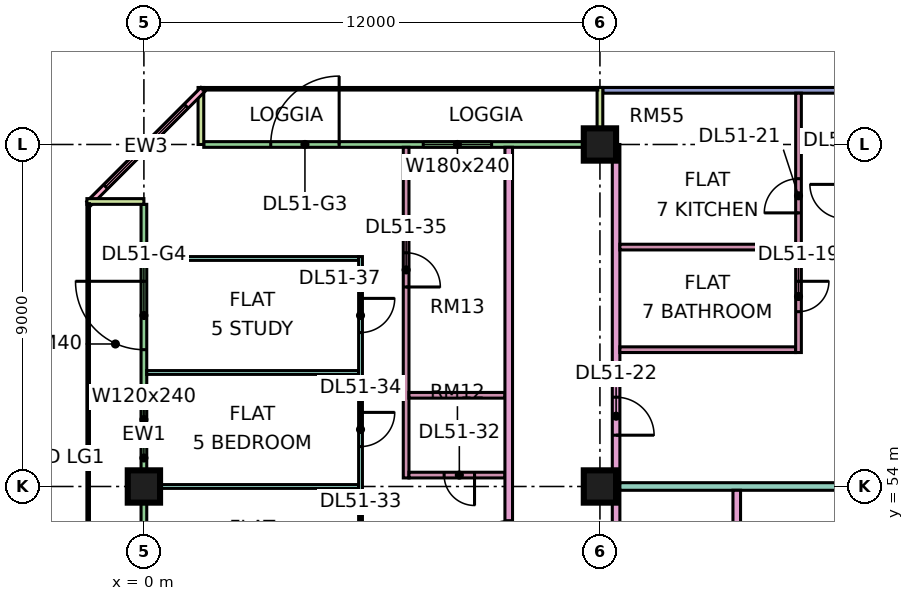
"""IFC4 building model, lengths in metres.
Left out: names, types, materials, properties, quantities, classifications, styles, units other than length and angle.
Written with IfcOpenShell. Run it as: python <this file> out.ifc"""

import sys

from ifc_helpers import new_model, si_unit, direction, frame, frame_2d, origin, origin_2d, place, context, subcontext, project, spatial, rectangle, extrude, element, fill, save


model = new_model("IFC4")
c1 = context("Model", 3, precision=1e-05, world=origin(), true_north=direction((0.0, 1.0)))
c2 = subcontext(c1, "Body", "Model", "MODEL_VIEW")
j1 = project(units=[si_unit("LENGTHUNIT", "METRE"), si_unit("PLANEANGLEUNIT", "RADIAN")], contexts=[c1])
p1 = place(None, origin())
s1 = spatial("IfcSite", under=j1, at=p1, CompositionType="ELEMENT")
p2 = place(p1, origin())
s2 = spatial("IfcBuilding", under=s1, at=p2, CompositionType="ELEMENT")
p3 = place(p2, frame((0.0, 0.0, 219.15)))
s3 = spatial("IfcBuildingStorey", under=s2, at=p3, CompositionType="ELEMENT", Elevation=219.15)
for number, where, z_axis, x_axis in (
    (1, (0.0, 54.0, 0.0), (0.0, 0.0, 1.0), (1.0, 0.0, 0.0)),
    (2, (12.0, 54.0, 0.0), (0.0, 0.0, 1.0), (1.0, 0.0, 0.0)),
    (3, (12.0, 63.0, 0.0), (0.0, 0.0, 1.0), (1.0, 0.0, 0.0)),
):
    element("IfcColumn", number, at=place(p3, frame(where, z_axis=z_axis, x_axis=x_axis)), inside=s3, PredefinedType="COLUMN", context=c2, shape_type="SweptSolid", body=[
        extrude(rectangle(XDim=0.85, YDim=0.85, at=origin_2d()), origin(), (0.0, 0.0, 1.0), 3.75),
    ])
p4 = place(p3, frame((22.5, 64.425, 0.0), z_axis=(0.0, 0.0, 1.0), x_axis=(-1.0, 0.0, 0.0)))
e4 = element("IfcWall", 4, at=p4, inside=s3, PredefinedType="SOLIDWALL", context=c2, shape_type="SweptSolid", body=[
    extrude(rectangle(XDim=10.425, YDim=0.15, at=frame_2d((5.212, 0.0))), origin(), (0.0, 0.0, 1.0), 3.35),
])
p5 = place(p4, frame((0.75, 0.0, 0.45)))
e5 = element("IfcOpeningElement", 5, at=p5, cuts=e4, PredefinedType="OPENING", context=c2, shape_type="SweptSolid", body=[
    extrude(rectangle(XDim=3.0, YDim=2.4, at=frame_2d((1.5, 1.2))), frame((0.0, 0.085, 0.0), z_axis=(0.0, -1.0, 0.0), x_axis=(1.0, 0.0, 0.0)), (0.0, 0.0, 1.0), 0.17),
])
p6 = place(p3, frame((11.925, 63.0, 0.0), z_axis=(0.0, 0.0, 1.0), x_axis=(-1.0, 0.0, 0.0)))
e6 = element("IfcWall", 6, at=p6, inside=s3, PredefinedType="SOLIDWALL", context=c2, shape_type="SweptSolid", body=[
    extrude(rectangle(XDim=10.35, YDim=0.15, at=frame_2d((5.175, 0.0))), origin(), (0.0, 0.0, 1.0), 3.35),
])
p7 = place(p6, frame((2.775, 0.0, 0.45)))
e7 = element("IfcOpeningElement", 7, at=p7, cuts=e6, PredefinedType="OPENING", context=c2, shape_type="SweptSolid", body=[
    extrude(rectangle(XDim=1.8, YDim=2.4, at=frame_2d((0.9, 1.2))), frame((0.0, 0.085, 0.0), z_axis=(0.0, -1.0, 0.0), x_axis=(1.0, 0.0, 0.0)), (0.0, 0.0, 1.0), 0.17),
])
p8 = place(p6, frame((6.788, 0.0, 0.0)))
e8 = element("IfcOpeningElement", 8, at=p8, cuts=e6, PredefinedType="OPENING", context=c2, shape_type="SweptSolid", body=[
    extrude(rectangle(XDim=1.8, YDim=2.4, at=frame_2d((0.9, 1.2))), frame((0.0, 0.085, 0.0), z_axis=(0.0, -1.0, 0.0), x_axis=(1.0, 0.0, 0.0)), (0.0, 0.0, 1.0), 0.17),
])
for number, where, z_axis, x_axis in (
    (9, (12.0, 64.5, 0.0), (0.0, 0.0, 1.0), (0.0, -1.0, 0.0)),
    (10, (1.5, 64.5, 0.0), (0.0, 0.0, 1.0), (0.0, -1.0, 0.0)),
):
    element("IfcWall", number, at=place(p3, frame(where, z_axis=z_axis, x_axis=x_axis)), inside=s3, PredefinedType="SOLIDWALL", context=c2, shape_type="SweptSolid", body=[
        extrude(rectangle(XDim=1.5, YDim=0.15, at=frame_2d((0.75, 0.0))), origin(), (0.0, 0.0, 1.0), 3.35),
    ])
p9 = place(p3, frame((1.553, 64.447, 0.0), z_axis=(0.0, 0.0, 1.0), x_axis=(-0.707106781187, -0.707106781187, 0.0)))
e11 = element("IfcWall", 11, at=p9, inside=s3, PredefinedType="SOLIDWALL", context=c2, shape_type="SweptSolid", body=[
    extrude(rectangle(XDim=4.243, YDim=0.15, at=frame_2d((2.121, 0.0))), origin(), (0.0, 0.0, 1.0), 3.35),
])
p10 = place(p9, frame((0.621, 0.0, 0.45)))
e12 = element("IfcOpeningElement", 12, at=p10, cuts=e11, PredefinedType="OPENING", context=c2, shape_type="SweptSolid", body=[
    extrude(rectangle(XDim=3.0, YDim=2.4, at=frame_2d((1.5, 1.2))), frame((0.0, 0.085, 0.0), z_axis=(0.0, -1.0, 0.0), x_axis=(1.0, 0.0, 0.0)), (0.0, 0.0, 1.0), 0.17),
])
p11 = place(p3, frame((0.0, 61.425, 0.0), z_axis=(0.0, 0.0, 1.0), x_axis=(0.0, -1.0, 0.0)))
e13 = element("IfcWall", 13, at=p11, inside=s3, PredefinedType="SOLIDWALL", context=c2, shape_type="SweptSolid", body=[
    extrude(rectangle(XDim=13.35, YDim=0.15, at=frame_2d((6.675, 0.0))), origin(), (0.0, 0.0, 1.0), 3.35),
])
p12 = place(p11, frame((2.025, 0.0, 0.0)))
e14 = element("IfcOpeningElement", 14, at=p12, cuts=e13, PredefinedType="OPENING", context=c2, shape_type="SweptSolid", body=[
    extrude(rectangle(XDim=1.8, YDim=2.4, at=frame_2d((0.9, 1.2))), frame((0.0, 0.085, 0.0), z_axis=(0.0, -1.0, 0.0), x_axis=(1.0, 0.0, 0.0)), (0.0, 0.0, 1.0), 0.17),
])
p13 = place(p11, frame((5.062, 0.0, 0.45)))
e15 = element("IfcOpeningElement", 15, at=p13, cuts=e13, PredefinedType="OPENING", context=c2, shape_type="SweptSolid", body=[
    extrude(rectangle(XDim=1.2, YDim=2.4, at=frame_2d((0.6, 1.2))), frame((0.0, 0.085, 0.0), z_axis=(0.0, -1.0, 0.0), x_axis=(1.0, 0.0, 0.0)), (0.0, 0.0, 1.0), 0.17),
])
p14 = place(p11, frame((8.587, 0.0, 0.45)))
e16 = element("IfcOpeningElement", 16, at=p14, cuts=e13, PredefinedType="OPENING", context=c2, shape_type="SweptSolid", body=[
    extrude(rectangle(XDim=1.2, YDim=2.4, at=frame_2d((0.6, 1.2))), frame((0.0, 0.085, 0.0), z_axis=(0.0, -1.0, 0.0), x_axis=(1.0, 0.0, 0.0)), (0.0, 0.0, 1.0), 0.17),
])
p15 = place(p11, frame((10.988, 0.0, 0.45)))
e17 = element("IfcOpeningElement", 17, at=p15, cuts=e13, PredefinedType="OPENING", context=c2, shape_type="SweptSolid", body=[
    extrude(rectangle(XDim=1.8, YDim=2.4, at=frame_2d((0.9, 1.2))), frame((0.0, 0.085, 0.0), z_axis=(0.0, -1.0, 0.0), x_axis=(1.0, 0.0, 0.0)), (0.0, 0.0, 1.0), 0.17),
])
p16 = place(p3, frame((-1.5, 61.5, 0.0), z_axis=(0.0, 0.0, 1.0), x_axis=(1.0, 0.0, 0.0)))
e18 = element("IfcWall", 18, at=p16, inside=s3, PredefinedType="SOLIDWALL", context=c2, shape_type="SweptSolid", body=[
    extrude(rectangle(XDim=1.5, YDim=0.15, at=frame_2d((0.75, 0.0))), origin(), (0.0, 0.0, 1.0), 3.35),
])
for number, where, z_axis, x_axis in (
    (19, (0.074, 54.0, 0.0), (0.0, 0.0, 1.0), (1.0, 0.0, 0.0)),
    (20, (0.074, 57.0, 0.0), (0.0, 0.0, 1.0), (1.0, 0.0, 0.0)),
    (21, (0.074, 60.0, 0.0), (0.0, 0.0, 1.0), (1.0, 0.0, 0.0)),
):
    element("IfcWall", number, at=place(p3, frame(where, z_axis=z_axis, x_axis=x_axis)), inside=s3, PredefinedType="PARTITIONING", context=c2, shape_type="SweptSolid", body=[
        extrude(rectangle(XDim=5.576, YDim=0.1, at=frame_2d((2.788, 0.0))), origin(), (0.0, 0.0, 1.0), 3.35),
    ])
p17 = place(p3, frame((5.7, 51.1, 0.0), z_axis=(0.0, 0.0, 1.0), x_axis=(0.0, 1.0, 0.0)))
e22 = element("IfcWall", 22, at=p17, inside=s3, PredefinedType="PARTITIONING", context=c2, shape_type="SweptSolid", body=[
    extrude(rectangle(XDim=8.95, YDim=0.1, at=frame_2d((4.475, 0.0))), origin(), (0.0, 0.0, 1.0), 3.35),
])
p18 = place(p17, frame((0.95, 0.0, 0.0)))
e23 = element("IfcOpeningElement", 23, at=p18, cuts=e22, PredefinedType="OPENING", context=c2, shape_type="SweptSolid", body=[
    extrude(rectangle(XDim=0.9, YDim=2.1, at=frame_2d((0.45, 1.05))), frame((0.0, 0.06, 0.0), z_axis=(0.0, -1.0, 0.0), x_axis=(1.0, 0.0, 0.0)), (0.0, 0.0, 1.0), 0.12),
])
p19 = place(p17, frame((3.95, 0.0, 0.0)))
e24 = element("IfcOpeningElement", 24, at=p19, cuts=e22, PredefinedType="OPENING", context=c2, shape_type="SweptSolid", body=[
    extrude(rectangle(XDim=0.9, YDim=2.1, at=frame_2d((0.45, 1.05))), frame((0.0, 0.06, 0.0), z_axis=(0.0, -1.0, 0.0), x_axis=(1.0, 0.0, 0.0)), (0.0, 0.0, 1.0), 0.12),
])
p20 = place(p17, frame((6.95, 0.0, 0.0)))
e25 = element("IfcOpeningElement", 25, at=p20, cuts=e22, PredefinedType="OPENING", context=c2, shape_type="SweptSolid", body=[
    extrude(rectangle(XDim=0.9, YDim=2.1, at=frame_2d((0.45, 1.05))), frame((0.0, 0.06, 0.0), z_axis=(0.0, -1.0, 0.0), x_axis=(1.0, 0.0, 0.0)), (0.0, 0.0, 1.0), 0.12),
])
p21 = place(p3, frame((6.9, 54.225, 0.0), z_axis=(0.0, 0.0, 1.0), x_axis=(0.0, 1.0, 0.0)))
e26 = element("IfcWall", 26, at=p21, inside=s3, PredefinedType="PARTITIONING", context=c2, shape_type="SweptSolid", body=[
    extrude(rectangle(XDim=8.701, YDim=0.15, at=frame_2d((4.351, 0.0))), origin(), (0.0, 0.0, 1.0), 3.35),
])
p22 = place(p21, frame((5.025, 0.0, 0.0)))
e27 = element("IfcOpeningElement", 27, at=p22, cuts=e26, PredefinedType="OPENING", context=c2, shape_type="SweptSolid", body=[
    extrude(rectangle(XDim=0.9, YDim=2.1, at=frame_2d((0.45, 1.05))), frame((0.0, 0.085, 0.0), z_axis=(0.0, -1.0, 0.0), x_axis=(1.0, 0.0, 0.0)), (0.0, 0.0, 1.0), 0.17),
])
p23 = place(p3, frame((6.975, 54.3, 0.0), z_axis=(0.0, 0.0, 1.0), x_axis=(1.0, 0.0, 0.0)))
e28 = element("IfcWall", 28, at=p23, inside=s3, PredefinedType="PARTITIONING", context=c2, shape_type="SweptSolid", body=[
    extrude(rectangle(XDim=2.525, YDim=0.15, at=frame_2d((1.262, 0.0))), origin(), (0.0, 0.0, 1.0), 3.35),
])
p24 = place(p23, frame((0.925, 0.0, 0.0)))
e29 = element("IfcOpeningElement", 29, at=p24, cuts=e28, PredefinedType="OPENING", context=c2, shape_type="SweptSolid", body=[
    extrude(rectangle(XDim=0.8, YDim=2.1, at=frame_2d((0.4, 1.05))), frame((0.0, 0.085, 0.0), z_axis=(0.0, -1.0, 0.0), x_axis=(1.0, 0.0, 0.0)), (0.0, 0.0, 1.0), 0.17),
])
p25 = place(p3, frame((6.975, 56.4, 0.0), z_axis=(0.0, 0.0, 1.0), x_axis=(1.0, 0.0, 0.0)))
e30 = element("IfcWall", 30, at=p25, inside=s3, PredefinedType="PARTITIONING", context=c2, shape_type="SweptSolid", body=[
    extrude(rectangle(XDim=2.525, YDim=0.15, at=frame_2d((1.262, 0.0))), origin(), (0.0, 0.0, 1.0), 3.35),
])
p26 = place(p3, frame((9.6, 20.0, 0.0), z_axis=(0.0, 0.0, 1.0), x_axis=(0.0, 1.0, 0.0)))
e31 = element("IfcWall", 31, at=p26, inside=s3, PredefinedType="PARTITIONING", context=c2, shape_type="SweptSolid", body=[
    extrude(rectangle(XDim=42.926, YDim=0.2, at=frame_2d((21.463, 0.0))), origin(), (0.0, 0.0, 1.0), 3.35),
])
p27 = place(p26, frame((17.1, 0.0, 0.0)))
e32 = element("IfcOpeningElement", 32, at=p27, cuts=e31, PredefinedType="OPENING", context=c2, shape_type="SweptSolid", body=[
    extrude(rectangle(XDim=1.0, YDim=2.1, at=frame_2d((0.5, 1.05))), frame((0.0, 0.11, 0.0), z_axis=(0.0, -1.0, 0.0), x_axis=(1.0, 0.0, 0.0)), (0.0, 0.0, 1.0), 0.22),
])
p28 = place(p26, frame((32.1, 0.0, 0.0)))
e33 = element("IfcOpeningElement", 33, at=p28, cuts=e31, PredefinedType="OPENING", context=c2, shape_type="SweptSolid", body=[
    extrude(rectangle(XDim=1.0, YDim=2.1, at=frame_2d((0.5, 1.05))), frame((0.0, 0.11, 0.0), z_axis=(0.0, -1.0, 0.0), x_axis=(1.0, 0.0, 0.0)), (0.0, 0.0, 1.0), 0.22),
])
p29 = place(p26, frame((0.6, 0.0, 0.0)))
e34 = element("IfcOpeningElement", 34, at=p29, cuts=e31, PredefinedType="OPENING", context=c2, shape_type="SweptSolid", body=[
    extrude(rectangle(XDim=1.2, YDim=2.1, at=frame_2d((0.6, 1.05))), frame((0.0, 0.11, 0.0), z_axis=(0.0, -1.0, 0.0), x_axis=(1.0, 0.0, 0.0)), (0.0, 0.0, 1.0), 0.22),
])
p30 = place(p26, frame((14.1, 0.0, 0.0)))
e35 = element("IfcOpeningElement", 35, at=p30, cuts=e31, PredefinedType="OPENING", context=c2, shape_type="SweptSolid", body=[
    extrude(rectangle(XDim=1.0, YDim=2.1, at=frame_2d((0.5, 1.05))), frame((0.0, 0.11, 0.0), z_axis=(0.0, -1.0, 0.0), x_axis=(1.0, 0.0, 0.0)), (0.0, 0.0, 1.0), 0.22),
])
p31 = place(p3, frame((12.425, 20.0, 0.0), z_axis=(0.0, 0.0, 1.0), x_axis=(0.0, 1.0, 0.0)))
e36 = element("IfcWall", 36, at=p31, inside=s3, PredefinedType="PARTITIONING", context=c2, shape_type="SweptSolid", body=[
    extrude(rectangle(XDim=43.0, YDim=0.2, at=frame_2d((21.5, 0.0))), origin(), (0.0, 0.0, 1.0), 3.35),
])
p32 = place(p31, frame((7.15, 0.0, 0.0)))
e37 = element("IfcOpeningElement", 37, at=p32, cuts=e36, PredefinedType="OPENING", context=c2, shape_type="SweptSolid", body=[
    extrude(rectangle(XDim=1.6, YDim=2.1, at=frame_2d((0.8, 1.05))), frame((0.0, 0.11, 0.0), z_axis=(0.0, -1.0, 0.0), x_axis=(1.0, 0.0, 0.0)), (0.0, 0.0, 1.0), 0.22),
])
p33 = place(p31, frame((13.5, 0.0, 0.0)))
e38 = element("IfcOpeningElement", 38, at=p33, cuts=e36, PredefinedType="OPENING", context=c2, shape_type="SweptSolid", body=[
    extrude(rectangle(XDim=1.0, YDim=2.1, at=frame_2d((0.5, 1.05))), frame((0.0, 0.11, 0.0), z_axis=(0.0, -1.0, 0.0), x_axis=(1.0, 0.0, 0.0)), (0.0, 0.0, 1.0), 0.22),
])
p34 = place(p31, frame((22.9, 0.0, 0.0)))
e39 = element("IfcOpeningElement", 39, at=p34, cuts=e36, PredefinedType="OPENING", context=c2, shape_type="SweptSolid", body=[
    extrude(rectangle(XDim=1.0, YDim=2.1, at=frame_2d((0.5, 1.05))), frame((0.0, 0.11, 0.0), z_axis=(0.0, -1.0, 0.0), x_axis=(1.0, 0.0, 0.0)), (0.0, 0.0, 1.0), 0.22),
])
p35 = place(p31, frame((35.35, 0.0, 0.0)))
e40 = element("IfcOpeningElement", 40, at=p35, cuts=e36, PredefinedType="OPENING", context=c2, shape_type="SweptSolid", body=[
    extrude(rectangle(XDim=1.0, YDim=2.1, at=frame_2d((0.5, 1.05))), frame((0.0, 0.11, 0.0), z_axis=(0.0, -1.0, 0.0), x_axis=(1.0, 0.0, 0.0)), (0.0, 0.0, 1.0), 0.22),
])
p36 = place(p31, frame((1.15, 0.0, 0.0)))
e41 = element("IfcOpeningElement", 41, at=p36, cuts=e36, PredefinedType="OPENING", context=c2, shape_type="SweptSolid", body=[
    extrude(rectangle(XDim=1.8, YDim=2.1, at=frame_2d((0.9, 1.05))), frame((0.0, 0.11, 0.0), z_axis=(0.0, -1.0, 0.0), x_axis=(1.0, 0.0, 0.0)), (0.0, 0.0, 1.0), 0.22),
])
p37 = place(p31, frame((28.6, 0.0, 0.0)))
e42 = element("IfcOpeningElement", 42, at=p37, cuts=e36, PredefinedType="OPENING", context=c2, shape_type="SweptSolid", body=[
    extrude(rectangle(XDim=1.8, YDim=2.1, at=frame_2d((0.9, 1.05))), frame((0.0, 0.11, 0.0), z_axis=(0.0, -1.0, 0.0), x_axis=(1.0, 0.0, 0.0)), (0.0, 0.0, 1.0), 0.22),
])
p38 = place(p3, frame((12.525, 54.0, 0.0), z_axis=(0.0, 0.0, 1.0), x_axis=(1.0, 0.0, 0.0)))
e43 = element("IfcWall", 43, at=p38, inside=s3, PredefinedType="PARTITIONING", context=c2, shape_type="SweptSolid", body=[
    extrude(rectangle(XDim=11.401, YDim=0.2, at=frame_2d((5.701, 0.0))), origin(), (0.0, 0.0, 1.0), 3.35),
])
for number, where, z_axis, x_axis in (
    (44, (12.525, 57.6, 0.0), (0.0, 0.0, 1.0), (1.0, 0.0, 0.0)),
    (45, (12.525, 60.3, 0.0), (0.0, 0.0, 1.0), (1.0, 0.0, 0.0)),
):
    element("IfcWall", number, at=place(p3, frame(where, z_axis=z_axis, x_axis=x_axis)), inside=s3, PredefinedType="PARTITIONING", context=c2, shape_type="SweptSolid", body=[
        extrude(rectangle(XDim=4.625, YDim=0.15, at=frame_2d((2.312, 0.0))), origin(), (0.0, 0.0, 1.0), 3.35),
    ])
p39 = place(p3, frame((15.6, 51.225, 0.0), z_axis=(0.0, 0.0, 1.0), x_axis=(0.0, 1.0, 0.0)))
e46 = element("IfcWall", 46, at=p39, inside=s3, PredefinedType="PARTITIONING", context=c2, shape_type="SweptSolid", body=[
    extrude(rectangle(XDim=2.675, YDim=0.2, at=frame_2d((1.337, 0.0))), origin(), (0.0, 0.0, 1.0), 3.35),
])
p40 = place(p3, frame((17.225, 57.525, 0.0), z_axis=(0.0, 0.0, 1.0), x_axis=(0.0, 1.0, 0.0)))
e47 = element("IfcWall", 47, at=p40, inside=s3, PredefinedType="PARTITIONING", context=c2, shape_type="SweptSolid", body=[
    extrude(rectangle(XDim=6.825, YDim=0.15, at=frame_2d((3.413, 0.0))), origin(), (0.0, 0.0, 1.0), 3.35),
])
p41 = place(p40, frame((1.075, 0.0, 0.0)))
e48 = element("IfcOpeningElement", 48, at=p41, cuts=e47, PredefinedType="OPENING", context=c2, shape_type="SweptSolid", body=[
    extrude(rectangle(XDim=0.8, YDim=2.1, at=frame_2d((0.4, 1.05))), frame((0.0, 0.085, 0.0), z_axis=(0.0, -1.0, 0.0), x_axis=(1.0, 0.0, 0.0)), (0.0, 0.0, 1.0), 0.17),
])
p42 = place(p40, frame((3.675, 0.0, 0.0)))
e49 = element("IfcOpeningElement", 49, at=p42, cuts=e47, PredefinedType="OPENING", context=c2, shape_type="SweptSolid", body=[
    extrude(rectangle(XDim=0.9, YDim=2.1, at=frame_2d((0.45, 1.05))), frame((0.0, 0.085, 0.0), z_axis=(0.0, -1.0, 0.0), x_axis=(1.0, 0.0, 0.0)), (0.0, 0.0, 1.0), 0.17),
])
p43 = place(p3, frame((18.0, 63.0, 0.0), z_axis=(0.0, 0.0, 1.0), x_axis=(1.0, 0.0, 0.0)))
e50 = element("IfcWall", 50, at=p43, inside=s3, PredefinedType="PARTITIONING", context=c2, shape_type="SweptSolid", body=[
    extrude(rectangle(XDim=0.375, YDim=0.1, at=frame_2d((0.188, 0.0))), origin(), (0.0, 0.0, 1.0), 3.35),
])
p44 = place(p7, origin())
e51 = element("IfcWindow", 51, at=p44, inside=s3, PartitioningType="SINGLE_PANEL", PredefinedType="WINDOW", context=c2, shape_type="SweptSolid", body=[
    extrude(rectangle(XDim=1.8, YDim=2.4, at=frame_2d((0.9, 1.2))), frame((0.0, 0.03, 0.0), z_axis=(0.0, -1.0, 0.0), x_axis=(1.0, 0.0, 0.0)), (0.0, 0.0, 1.0), 0.06),
])
fill(e7, e51)
p45 = place(p8, frame((1.8, 0.0, 0.0), z_axis=(0.0, 0.0, 1.0), x_axis=(-1.0, 0.0, 0.0)))
e52 = element("IfcDoor", 52, at=p45, inside=s3, OperationType="DOUBLE_DOOR_SINGLE_SWING", PredefinedType="DOOR", context=c2, shape_type="SweptSolid", body=[
    extrude(rectangle(XDim=1.8, YDim=2.4, at=frame_2d((0.9, 1.2))), frame((0.0, 0.025, 0.0), z_axis=(0.0, -1.0, 0.0), x_axis=(1.0, 0.0, 0.0)), (0.0, 0.0, 1.0), 0.05),
])
fill(e8, e52)
p46 = place(p10, origin())
e53 = element("IfcWindow", 53, at=p46, inside=s3, PartitioningType="SINGLE_PANEL", PredefinedType="WINDOW", context=c2, shape_type="SweptSolid", body=[
    extrude(rectangle(XDim=3.0, YDim=2.4, at=frame_2d((1.5, 1.2))), frame((0.0, 0.03, 0.0), z_axis=(0.0, -1.0, 0.0), x_axis=(1.0, 0.0, 0.0)), (0.0, 0.0, 1.0), 0.06),
])
fill(e12, e53)
p47 = place(p12, frame((1.8, 0.0, 0.0), z_axis=(0.0, 0.0, 1.0), x_axis=(-1.0, 0.0, 0.0)))
e54 = element("IfcDoor", 54, at=p47, inside=s3, OperationType="DOUBLE_DOOR_SINGLE_SWING", PredefinedType="DOOR", context=c2, shape_type="SweptSolid", body=[
    extrude(rectangle(XDim=1.8, YDim=2.4, at=frame_2d((0.9, 1.2))), frame((0.0, 0.025, 0.0), z_axis=(0.0, -1.0, 0.0), x_axis=(1.0, 0.0, 0.0)), (0.0, 0.0, 1.0), 0.05),
])
fill(e14, e54)
p48 = place(p13, origin())
e55 = element("IfcWindow", 55, at=p48, inside=s3, PartitioningType="SINGLE_PANEL", PredefinedType="WINDOW", context=c2, shape_type="SweptSolid", body=[
    extrude(rectangle(XDim=1.2, YDim=2.4, at=frame_2d((0.6, 1.2))), frame((0.0, 0.03, 0.0), z_axis=(0.0, -1.0, 0.0), x_axis=(1.0, 0.0, 0.0)), (0.0, 0.0, 1.0), 0.06),
])
fill(e15, e55)
p49 = place(p41, origin())
e56 = element("IfcDoor", 56, at=p49, inside=s3, OperationType="SINGLE_SWING_RIGHT", PredefinedType="DOOR", context=c2, shape_type="SweptSolid", body=[
    extrude(rectangle(XDim=0.8, YDim=2.1, at=frame_2d((0.4, 1.05))), frame((0.0, 0.025, 0.0), z_axis=(0.0, -1.0, 0.0), x_axis=(1.0, 0.0, 0.0)), (0.0, 0.0, 1.0), 0.05),
])
fill(e48, e56)
p50 = place(p42, origin())
e57 = element("IfcDoor", 57, at=p50, inside=s3, OperationType="SINGLE_SWING_LEFT", PredefinedType="DOOR", context=c2, shape_type="SweptSolid", body=[
    extrude(rectangle(XDim=0.9, YDim=2.1, at=frame_2d((0.45, 1.05))), frame((0.0, 0.025, 0.0), z_axis=(0.0, -1.0, 0.0), x_axis=(1.0, 0.0, 0.0)), (0.0, 0.0, 1.0), 0.05),
])
fill(e49, e57)
p51 = place(p35, frame((1.0, 0.0, 0.0), z_axis=(0.0, 0.0, 1.0), x_axis=(-1.0, 0.0, 0.0)))
e58 = element("IfcDoor", 58, at=p51, inside=s3, OperationType="SINGLE_SWING_LEFT", PredefinedType="DOOR", context=c2, shape_type="SweptSolid", body=[
    extrude(rectangle(XDim=1.0, YDim=2.1, at=frame_2d((0.5, 1.05))), frame((0.0, 0.025, 0.0), z_axis=(0.0, -1.0, 0.0), x_axis=(1.0, 0.0, 0.0)), (0.0, 0.0, 1.0), 0.05),
])
fill(e40, e58)
p52 = place(p24, origin())
e59 = element("IfcDoor", 59, at=p52, inside=s3, OperationType="SINGLE_SWING_RIGHT", PredefinedType="DOOR", context=c2, shape_type="SweptSolid", body=[
    extrude(rectangle(XDim=0.8, YDim=2.1, at=frame_2d((0.4, 1.05))), frame((0.0, 0.025, 0.0), z_axis=(0.0, -1.0, 0.0), x_axis=(1.0, 0.0, 0.0)), (0.0, 0.0, 1.0), 0.05),
])
fill(e29, e59)
p53 = place(p19, origin())
e60 = element("IfcDoor", 60, at=p53, inside=s3, OperationType="SINGLE_SWING_RIGHT", PredefinedType="DOOR", context=c2, shape_type="SweptSolid", body=[
    extrude(rectangle(XDim=0.9, YDim=2.1, at=frame_2d((0.45, 1.05))), frame((0.0, 0.025, 0.0), z_axis=(0.0, -1.0, 0.0), x_axis=(1.0, 0.0, 0.0)), (0.0, 0.0, 1.0), 0.05),
])
fill(e24, e60)
p54 = place(p22, frame((0.9, 0.0, 0.0), z_axis=(0.0, 0.0, 1.0), x_axis=(-1.0, 0.0, 0.0)))
e61 = element("IfcDoor", 61, at=p54, inside=s3, OperationType="SINGLE_SWING_LEFT", PredefinedType="DOOR", context=c2, shape_type="SweptSolid", body=[
    extrude(rectangle(XDim=0.9, YDim=2.1, at=frame_2d((0.45, 1.05))), frame((0.0, 0.025, 0.0), z_axis=(0.0, -1.0, 0.0), x_axis=(1.0, 0.0, 0.0)), (0.0, 0.0, 1.0), 0.05),
])
fill(e27, e61)
p55 = place(p28, origin())
e62 = element("IfcDoor", 62, at=p55, inside=s3, OperationType="SINGLE_SWING_LEFT", PredefinedType="DOOR", context=c2, shape_type="SweptSolid", body=[
    extrude(rectangle(XDim=1.0, YDim=2.1, at=frame_2d((0.5, 1.05))), frame((0.0, 0.025, 0.0), z_axis=(0.0, -1.0, 0.0), x_axis=(1.0, 0.0, 0.0)), (0.0, 0.0, 1.0), 0.05),
])
fill(e33, e62)
p56 = place(p20, origin())
e63 = element("IfcDoor", 63, at=p56, inside=s3, OperationType="SINGLE_SWING_RIGHT", PredefinedType="DOOR", context=c2, shape_type="SweptSolid", body=[
    extrude(rectangle(XDim=0.9, YDim=2.1, at=frame_2d((0.45, 1.05))), frame((0.0, 0.025, 0.0), z_axis=(0.0, -1.0, 0.0), x_axis=(1.0, 0.0, 0.0)), (0.0, 0.0, 1.0), 0.05),
])
fill(e25, e63)
save(model, sys.argv[1])
